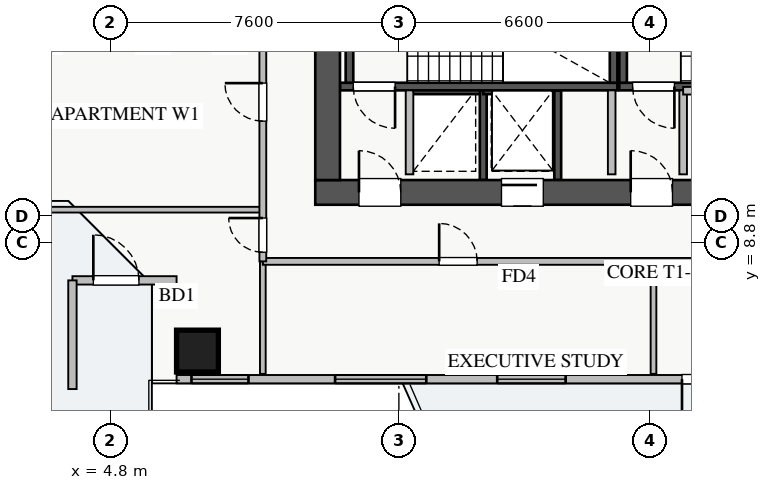
"""IFC4 building model, lengths in metres.
Left out: names, types, materials, properties, quantities, classifications, styles, units other than length and angle.
Written with IfcOpenShell. Run it as: python <this file> out.ifc"""

import sys

from ifc_helpers import new_model, si_unit, direction, frame, frame_2d, origin, origin_2d, place, context, subcontext, project, spatial, rectangle, extrude, source, transform, mapped, element, fill, save


model = new_model("IFC4")
c1 = context("Model", 3, precision=1e-05, world=origin(), true_north=direction((0.0, 1.0)))
c2 = subcontext(c1, "Body", "Model", "MODEL_VIEW")
j1 = project(units=[si_unit("LENGTHUNIT", "METRE"), si_unit("PLANEANGLEUNIT", "RADIAN")], contexts=[c1])
p1 = place(None, origin())
s1 = spatial("IfcSite", under=j1, at=p1, CompositionType="ELEMENT")
p2 = place(p1, origin())
s2 = spatial("IfcBuilding", under=s1, at=p2, CompositionType="ELEMENT")
p3 = place(p2, frame((0.0, 0.0, 103.5)))
s3 = spatial("IfcBuildingStorey", under=s2, at=p3, CompositionType="ELEMENT", Elevation=103.5)
p4 = place(p3, frame((12.68, 12.8, 0.0), z_axis=(0.0, 0.0, 1.0), x_axis=(1.0, 0.0, 0.0)))
e1 = element("IfcWall", 1, at=p4, inside=s3, PredefinedType="SHEAR", context=c2, shape_type="SweptSolid", body=[
    extrude(rectangle(XDim=1.94, YDim=0.18, at=frame_2d((0.97, 0.0))), origin(), (0.0, 0.0, 1.0), 3.07),
])
p5 = place(p3, frame((14.62, 10.45, 0.0), z_axis=(0.0, 0.0, 1.0), x_axis=(0.0, 1.0, 0.0)))
e2 = element("IfcWall", 2, at=p5, inside=s3, PredefinedType="SHEAR", context=c2, shape_type="SweptSolid", body=[
    extrude(rectangle(XDim=2.35, YDim=0.18, at=frame_2d((1.175, 0.0))), origin(), (0.0, 0.0, 1.0), 3.07),
])
p6 = place(p3, frame((14.62, 12.8, 0.0), z_axis=(0.0, 0.0, 1.0), x_axis=(1.0, 0.0, 0.0)))
e3 = element("IfcWall", 3, at=p6, inside=s3, PredefinedType="SHEAR", context=c2, shape_type="SweptSolid", body=[
    extrude(rectangle(XDim=1.96, YDim=0.18, at=frame_2d((0.98, 0.0))), origin(), (0.0, 0.0, 1.0), 3.07),
])
p7 = place(p3, frame((16.58, 10.45, 0.0), z_axis=(0.0, 0.0, 1.0), x_axis=(0.0, 1.0, 0.0)))
e4 = element("IfcWall", 4, at=p7, inside=s3, PredefinedType="SHEAR", context=c2, shape_type="SweptSolid", body=[
    extrude(rectangle(XDim=2.35, YDim=0.18, at=frame_2d((1.175, 0.0))), origin(), (0.0, 0.0, 1.0), 3.07),
])
p8 = place(p3, frame((10.85, 12.91, 0.0), z_axis=(0.0, 0.0, 1.0), x_axis=(1.0, 0.0, 0.0)))
e5 = element("IfcWall", 5, at=p8, inside=s3, PredefinedType="SHEAR", context=c2, shape_type="SweptSolid", body=[
    extrude(rectangle(XDim=7.3, YDim=0.2, at=frame_2d((3.65, 0.0))), origin(), (0.0, 0.0, 1.0), 3.25),
])
p9 = place(p8, frame((0.35, 0.0, 0.0)))
e6 = element("IfcOpeningElement", 6, at=p9, cuts=e5, PredefinedType="OPENING", context=c2, shape_type="SweptSolid", body=[
    extrude(rectangle(XDim=1.1, YDim=2.05, at=frame_2d((0.55, 1.025))), frame((0.0, 0.11, 0.0), z_axis=(0.0, -1.0, 0.0), x_axis=(1.0, 0.0, 0.0)), (0.0, 0.0, 1.0), 0.22),
])
for number, where, z_axis, x_axis in (
    (7, (11.1, 13.01, 0.0), (0.0, 0.0, 1.0), (0.0, 1.0, 0.0)),
    (8, (18.05, 13.01, 0.0), (0.0, 0.0, 1.0), (0.0, 1.0, 0.0)),
):
    element("IfcWall", number, at=place(p3, frame(where, z_axis=z_axis, x_axis=x_axis)), inside=s3, PredefinedType="SHEAR", context=c2, shape_type="SweptSolid", body=[
        extrude(rectangle(XDim=2.94, YDim=0.2, at=frame_2d((1.47, 0.0))), origin(), (0.0, 0.0, 1.0), 3.25),
    ])
p10 = place(p3, frame((18.2, 12.91, 0.0), z_axis=(0.0, 0.0, 1.0), x_axis=(1.0, 0.0, 0.0)))
e9 = element("IfcWall", 9, at=p10, inside=s3, PredefinedType="SHEAR", context=c2, shape_type="SweptSolid", body=[
    extrude(rectangle(XDim=7.15, YDim=0.2, at=frame_2d((3.575, 0.0))), origin(), (0.0, 0.0, 1.0), 3.25),
])
p11 = place(p10, frame((0.35, 0.0, 0.0)))
e10 = element("IfcOpeningElement", 10, at=p11, cuts=e9, PredefinedType="OPENING", context=c2, shape_type="SweptSolid", body=[
    extrude(rectangle(XDim=1.1, YDim=2.05, at=frame_2d((0.55, 1.025))), frame((0.0, 0.11, 0.0), z_axis=(0.0, -1.0, 0.0), x_axis=(1.0, 0.0, 0.0)), (0.0, 0.0, 1.0), 0.22),
])
p12 = place(p3, frame((18.3, 13.01, 0.0), z_axis=(0.0, 0.0, 1.0), x_axis=(0.0, 1.0, 0.0)))
e11 = element("IfcWall", 11, at=p12, inside=s3, PredefinedType="SHEAR", context=c2, shape_type="SweptSolid", body=[
    extrude(rectangle(XDim=2.94, YDim=0.2, at=frame_2d((1.47, 0.0))), origin(), (0.0, 0.0, 1.0), 3.25),
])
p13 = place(p3, frame((10.2, 10.125, 0.0), z_axis=(0.0, 0.0, 1.0), x_axis=(1.0, 0.0, 0.0)))
e12 = element("IfcWall", 12, at=p13, inside=s3, PredefinedType="SHEAR", context=c2, shape_type="SweptSolid", body=[
    extrude(rectangle(XDim=17.6, YDim=0.65, at=frame_2d((8.8, 0.0))), origin(), (0.0, 0.0, 1.0), 3.25),
])
p14 = place(p13, frame((1.15, 0.0, 0.0)))
e13 = element("IfcOpeningElement", 13, at=p14, cuts=e12, PredefinedType="OPENING", context=c2, shape_type="SweptSolid", body=[
    extrude(rectangle(XDim=1.1, YDim=2.05, at=frame_2d((0.55, 1.025))), frame((0.0, 0.335, 0.0), z_axis=(0.0, -1.0, 0.0), x_axis=(1.0, 0.0, 0.0)), (0.0, 0.0, 1.0), 0.67),
])
p15 = place(p13, frame((8.3, 0.0, 0.0)))
e14 = element("IfcOpeningElement", 14, at=p15, cuts=e12, PredefinedType="OPENING", context=c2, shape_type="SweptSolid", body=[
    extrude(rectangle(XDim=1.1, YDim=2.05, at=frame_2d((0.55, 1.025))), frame((0.0, 0.335, 0.0), z_axis=(0.0, -1.0, 0.0), x_axis=(1.0, 0.0, 0.0)), (0.0, 0.0, 1.0), 0.67),
])
p16 = place(p13, frame((4.9, 0.0, 0.0)))
e15 = element("IfcOpeningElement", 15, at=p16, cuts=e12, PredefinedType="OPENING", context=c2, shape_type="SweptSolid", body=[
    extrude(rectangle(XDim=1.1, YDim=2.05, at=frame_2d((0.55, 1.025))), frame((0.0, 0.335, 0.0), z_axis=(0.0, -1.0, 0.0), x_axis=(1.0, 0.0, 0.0)), (0.0, 0.0, 1.0), 0.67),
])
p17 = place(p13, frame((14.74, 0.0, 0.0)))
e16 = element("IfcOpeningElement", 16, at=p17, cuts=e12, PredefinedType="OPENING", context=c2, shape_type="SweptSolid", body=[
    extrude(rectangle(XDim=1.0, YDim=2.05, at=frame_2d((0.5, 1.025))), frame((0.0, 0.335, 0.0), z_axis=(0.0, -1.0, 0.0), x_axis=(1.0, 0.0, 0.0)), (0.0, 0.0, 1.0), 0.67),
])
p18 = place(p13, frame((10.155, 0.0, 0.0)))
e17 = element("IfcOpeningElement", 17, at=p18, cuts=e12, PredefinedType="OPENING", context=c2, shape_type="SweptSolid", body=[
    extrude(rectangle(XDim=1.0, YDim=2.05, at=frame_2d((0.5, 1.025))), frame((0.0, 0.335, 0.0), z_axis=(0.0, -1.0, 0.0), x_axis=(1.0, 0.0, 0.0)), (0.0, 0.0, 1.0), 0.67),
])
p19 = place(p13, frame((11.87, 0.0, 0.0)))
e18 = element("IfcOpeningElement", 18, at=p19, cuts=e12, PredefinedType="OPENING", context=c2, shape_type="SweptSolid", body=[
    extrude(rectangle(XDim=1.0, YDim=2.05, at=frame_2d((0.5, 1.025))), frame((0.0, 0.335, 0.0), z_axis=(0.0, -1.0, 0.0), x_axis=(1.0, 0.0, 0.0)), (0.0, 0.0, 1.0), 0.67),
])
p20 = place(p13, frame((13.46, 0.0, 0.0)))
e19 = element("IfcOpeningElement", 19, at=p20, cuts=e12, PredefinedType="OPENING", context=c2, shape_type="SweptSolid", body=[
    extrude(rectangle(XDim=1.0, YDim=2.05, at=frame_2d((0.5, 1.025))), frame((0.0, 0.335, 0.0), z_axis=(0.0, -1.0, 0.0), x_axis=(1.0, 0.0, 0.0)), (0.0, 0.0, 1.0), 0.67),
])
p21 = place(p3, frame((10.525, 10.45, 0.0), z_axis=(0.0, 0.0, 1.0), x_axis=(0.0, 1.0, 0.0)))
e20 = element("IfcWall", 20, at=p21, inside=s3, PredefinedType="SHEAR", context=c2, shape_type="SweptSolid", body=[
    extrude(rectangle(XDim=5.9, YDim=0.65, at=frame_2d((2.95, 0.0))), origin(), (0.0, 0.0, 1.0), 3.25),
])
m1 = source(origin(), c2, "Body", "SweptSolid", [
    extrude(rectangle(XDim=1.1, YDim=1.1, at=origin_2d()), origin(), (0.0, 0.0, 1.0), 3.25),
])
p22 = place(p3, frame((7.1, 5.95, 0.0), z_axis=(0.0, 0.0, 1.0), x_axis=(1.0, 0.0, 0.0)))
e21 = element("IfcColumn", 21, at=p22, inside=s3, PredefinedType="COLUMN", context=c2, shape_type="MappedRepresentation", body=[
    mapped(m1, transform((0.0, 0.0, 0.0), x_axis=(1.0, 0.0, 0.0), y_axis=(0.0, 1.0, 0.0), z_axis=(0.0, 0.0, 1.0), scale=1.0)),
])
p23 = place(p3, frame((6.55, 5.21, 0.0), z_axis=(0.0, 0.0, 1.0), x_axis=(1.0, 0.0, 0.0)))
e22 = element("IfcWall", 22, at=p23, inside=s3, PredefinedType="STANDARD", context=c2, shape_type="SweptSolid", body=[
    extrude(rectangle(XDim=24.9, YDim=0.22, at=frame_2d((12.45, 0.0))), origin(), (0.0, 0.0, 1.0), 2.61),
])
p24 = place(p23, frame((13.3, 0.0, 0.0)))
e23 = element("IfcOpeningElement", 23, at=p24, cuts=e22, PredefinedType="OPENING", context=c2, shape_type="SweptSolid", body=[
    extrude(rectangle(XDim=1.2, YDim=2.1, at=frame_2d((0.6, 1.05))), frame((0.0, 0.12, 0.0), z_axis=(0.0, -1.0, 0.0), x_axis=(1.0, 0.0, 0.0)), (0.0, 0.0, 1.0), 0.24),
])
p25 = place(p23, frame((0.393, 0.0, 0.9)))
e24 = element("IfcOpeningElement", 24, at=p25, cuts=e22, PredefinedType="OPENING", context=c2, shape_type="SweptSolid", body=[
    extrude(rectangle(XDim=1.5, YDim=1.5, at=frame_2d((0.75, 0.75))), frame((0.0, 0.12, 0.0), z_axis=(0.0, -1.0, 0.0), x_axis=(1.0, 0.0, 0.0)), (0.0, 0.0, 1.0), 0.24),
])
p26 = place(p23, frame((8.438, 0.0, 0.9)))
e25 = element("IfcOpeningElement", 25, at=p26, cuts=e22, PredefinedType="OPENING", context=c2, shape_type="SweptSolid", body=[
    extrude(rectangle(XDim=1.8, YDim=1.45, at=frame_2d((0.9, 0.725))), frame((0.0, 0.12, 0.0), z_axis=(0.0, -1.0, 0.0), x_axis=(1.0, 0.0, 0.0)), (0.0, 0.0, 1.0), 0.24),
])
p27 = place(p23, frame((14.813, 0.0, 0.9)))
e26 = element("IfcOpeningElement", 26, at=p27, cuts=e22, PredefinedType="OPENING", context=c2, shape_type="SweptSolid", body=[
    extrude(rectangle(XDim=1.5, YDim=1.45, at=frame_2d((0.75, 0.725))), frame((0.0, 0.12, 0.0), z_axis=(0.0, -1.0, 0.0), x_axis=(1.0, 0.0, 0.0)), (0.0, 0.0, 1.0), 0.24),
])
p28 = place(p23, frame((20.738, 0.0, 0.9)))
e27 = element("IfcOpeningElement", 27, at=p28, cuts=e22, PredefinedType="OPENING", context=c2, shape_type="SweptSolid", body=[
    extrude(rectangle(XDim=2.1, YDim=1.48, at=frame_2d((1.05, 0.74))), frame((0.0, 0.12, 0.0), z_axis=(0.0, -1.0, 0.0), x_axis=(1.0, 0.0, 0.0)), (0.0, 0.0, 1.0), 0.24),
])
p29 = place(p23, frame((4.171, 0.0, 0.9)))
e28 = element("IfcOpeningElement", 28, at=p29, cuts=e22, PredefinedType="OPENING", context=c2, shape_type="SweptSolid", body=[
    extrude(rectangle(XDim=2.4, YDim=1.5, at=frame_2d((1.2, 0.75))), frame((0.0, 0.12, 0.0), z_axis=(0.0, -1.0, 0.0), x_axis=(1.0, 0.0, 0.0)), (0.0, 0.0, 1.0), 0.24),
])
p30 = place(p3, frame((3.81, 7.81, 0.0), z_axis=(0.0, 0.0, 1.0), x_axis=(1.0, 0.0, 0.0)))
e29 = element("IfcWall", 29, at=p30, inside=s3, PredefinedType="STANDARD", context=c2, shape_type="SweptSolid", body=[
    extrude(rectangle(XDim=2.74, YDim=0.22, at=frame_2d((1.37, 0.0))), origin(), (0.0, 0.0, 1.0), 2.61),
])
p31 = place(p30, frame((0.55, 0.0, 0.0)))
e30 = element("IfcOpeningElement", 30, at=p31, cuts=e29, PredefinedType="OPENING", context=c2, shape_type="SweptSolid", body=[
    extrude(rectangle(XDim=1.2, YDim=2.1, at=frame_2d((0.6, 1.05))), frame((0.0, 0.12, 0.0), z_axis=(0.0, -1.0, 0.0), x_axis=(1.0, 0.0, 0.0)), (0.0, 0.0, 1.0), 0.24),
])
p32 = place(p3, frame((3.81, 4.95, 0.0), z_axis=(0.0, 0.0, 1.0), x_axis=(0.0, 1.0, 0.0)))
e31 = element("IfcWall", 31, at=p32, inside=s3, PredefinedType="STANDARD", context=c2, shape_type="SweptSolid", body=[
    extrude(rectangle(XDim=2.86, YDim=0.22, at=frame_2d((1.43, 0.0))), origin(), (0.0, 0.0, 1.0), 2.61),
])
for number, where, z_axis, x_axis in (
    (32, (12.68, 10.6, 0.0), (0.0, 0.0, 1.0), (0.0, 1.0, 0.0)),
    (33, (18.0, 10.6, 0.0), (0.0, 0.0, 1.0), (0.0, 1.0, 0.0)),
    (34, (19.88, 10.6, 0.0), (0.0, 0.0, 1.0), (0.0, 1.0, 0.0)),
):
    element("IfcWall", number, at=place(p3, frame(where, z_axis=z_axis, x_axis=x_axis)), inside=s3, PredefinedType="PARTITIONING", context=c2, shape_type="SweptSolid", body=[
        extrude(rectangle(XDim=2.21, YDim=0.2, at=frame_2d((1.105, 0.0))), origin(), (0.0, 0.0, 1.0), 3.07),
    ])
p33 = place(p3, frame((19.88, 12.8, 0.0), z_axis=(0.0, 0.0, 1.0), x_axis=(1.0, 0.0, 0.0)))
e35 = element("IfcWall", 35, at=p33, inside=s3, PredefinedType="PARTITIONING", context=c2, shape_type="SweptSolid", body=[
    extrude(rectangle(XDim=1.87, YDim=0.2, at=frame_2d((0.935, 0.0))), origin(), (0.0, 0.0, 1.0), 3.07),
])
p34 = place(p3, frame((19.1, 5.35, 0.0), z_axis=(0.0, 0.0, 1.0), x_axis=(0.0, 1.0, 0.0)))
e36 = element("IfcWall", 36, at=p34, inside=s3, PredefinedType="PARTITIONING", context=c2, shape_type="SweptSolid", body=[
    extrude(rectangle(XDim=2.96, YDim=0.15, at=frame_2d((1.48, 0.0))), origin(), (0.0, 0.0, 1.0), 2.865),
])
p35 = place(p3, frame((8.82, 5.35, 0.0), z_axis=(0.0, 0.0, 1.0), x_axis=(0.0, 1.0, 0.0)))
e37 = element("IfcWall", 37, at=p35, inside=s3, PredefinedType="PARTITIONING", context=c2, shape_type="SweptSolid", body=[
    extrude(rectangle(XDim=2.96, YDim=0.15, at=frame_2d((1.48, 0.0))), origin(), (0.0, 0.0, 1.0), 3.07),
])
p36 = place(p3, frame((8.82, 8.31, 0.0), z_axis=(0.0, 0.0, 1.0), x_axis=(1.0, 0.0, 0.0)))
e38 = element("IfcWall", 38, at=p36, inside=s3, PredefinedType="PARTITIONING", context=c2, shape_type="SweptSolid", body=[
    extrude(rectangle(XDim=23.58, YDim=0.18, at=frame_2d((11.79, 0.0))), origin(), (0.0, 0.0, 1.0), 3.07),
])
p37 = place(p36, frame((4.64, 0.0, 0.0)))
e39 = element("IfcOpeningElement", 39, at=p37, cuts=e38, PredefinedType="OPENING", context=c2, shape_type="SweptSolid", body=[
    extrude(rectangle(XDim=1.0, YDim=2.05, at=frame_2d((0.5, 1.025))), frame((0.0, 0.1, 0.0), z_axis=(0.0, -1.0, 0.0), x_axis=(1.0, 0.0, 0.0)), (0.0, 0.0, 1.0), 0.2),
])
p38 = place(p36, frame((16.22, 0.0, 0.0)))
e40 = element("IfcOpeningElement", 40, at=p38, cuts=e38, PredefinedType="OPENING", context=c2, shape_type="SweptSolid", body=[
    extrude(rectangle(XDim=1.0, YDim=2.05, at=frame_2d((0.5, 1.025))), frame((0.0, 0.1, 0.0), z_axis=(0.0, -1.0, 0.0), x_axis=(1.0, 0.0, 0.0)), (0.0, 0.0, 1.0), 0.2),
])
p39 = place(p3, frame((1.35, 9.67, 0.0), z_axis=(0.0, 0.0, 1.0), x_axis=(1.0, 0.0, 0.0)))
e41 = element("IfcWall", 41, at=p39, inside=s3, PredefinedType="PARTITIONING", context=c2, shape_type="SweptSolid", body=[
    extrude(rectangle(XDim=7.47, YDim=0.15, at=frame_2d((3.735, 0.0))), origin(), (0.0, 0.0, 1.0), 3.07),
])
p40 = place(p3, frame((8.82, 8.31, 0.0), z_axis=(0.0, 0.0, 1.0), x_axis=(0.0, 1.0, 0.0)))
e42 = element("IfcWall", 42, at=p40, inside=s3, PredefinedType="PARTITIONING", context=c2, shape_type="SweptSolid", body=[
    extrude(rectangle(XDim=29.13, YDim=0.18, at=frame_2d((14.565, 0.0))), origin(), (0.0, 0.0, 1.0), 3.07),
])
p41 = place(p40, frame((27.94, 0.0, 0.0)))
e43 = element("IfcOpeningElement", 43, at=p41, cuts=e42, PredefinedType="OPENING", context=c2, shape_type="SweptSolid", body=[
    extrude(rectangle(XDim=0.9, YDim=2.05, at=frame_2d((0.45, 1.025))), frame((0.0, 0.1, 0.0), z_axis=(0.0, -1.0, 0.0), x_axis=(1.0, 0.0, 0.0)), (0.0, 0.0, 1.0), 0.2),
])
p42 = place(p40, frame((0.24, 0.0, 0.0)))
e44 = element("IfcOpeningElement", 44, at=p42, cuts=e42, PredefinedType="OPENING", context=c2, shape_type="SweptSolid", body=[
    extrude(rectangle(XDim=0.9, YDim=2.05, at=frame_2d((0.45, 1.025))), frame((0.0, 0.1, 0.0), z_axis=(0.0, -1.0, 0.0), x_axis=(1.0, 0.0, 0.0)), (0.0, 0.0, 1.0), 0.2),
])
p43 = place(p40, frame((3.69, 0.0, 0.0)))
e45 = element("IfcOpeningElement", 45, at=p43, cuts=e42, PredefinedType="OPENING", context=c2, shape_type="SweptSolid", body=[
    extrude(rectangle(XDim=1.0, YDim=2.05, at=frame_2d((0.5, 1.025))), frame((0.0, 0.1, 0.0), z_axis=(0.0, -1.0, 0.0), x_axis=(1.0, 0.0, 0.0)), (0.0, 0.0, 1.0), 0.2),
])
p44 = place(p40, frame((20.305, 0.0, 0.0)))
e46 = element("IfcOpeningElement", 46, at=p44, cuts=e42, PredefinedType="OPENING", context=c2, shape_type="SweptSolid", body=[
    extrude(rectangle(XDim=1.0, YDim=2.05, at=frame_2d((0.5, 1.025))), frame((0.0, 0.1, 0.0), z_axis=(0.0, -1.0, 0.0), x_axis=(1.0, 0.0, 0.0)), (0.0, 0.0, 1.0), 0.2),
])
m2 = source(origin(), c2, "Body", "SweptSolid", [
    extrude(rectangle(XDim=1.2, YDim=2.1, at=frame_2d((0.6, 1.05))), frame((0.0, 0.025, 0.0), z_axis=(0.0, -1.0, 0.0), x_axis=(1.0, 0.0, 0.0)), (0.0, 0.0, 1.0), 0.05),
])
p45 = place(p24, frame((1.2, 0.0, 0.0), z_axis=(0.0, 0.0, 1.0), x_axis=(-1.0, 0.0, 0.0)))
e47 = element("IfcDoor", 47, at=p45, inside=s3, OperationType="SINGLE_SWING_LEFT", PredefinedType="DOOR", context=c2, shape_type="MappedRepresentation", body=[
    mapped(m2, transform((0.0, 0.0, 0.0), x_axis=(1.0, 0.0, 0.0), y_axis=(0.0, 1.0, 0.0), z_axis=(0.0, 0.0, 1.0), scale=1.0)),
])
fill(e23, e47)
m3 = source(origin(), c2, "Body", "SweptSolid", [
    extrude(rectangle(XDim=1.5, YDim=1.5, at=frame_2d((0.75, 0.75))), frame((0.0, 0.03, 0.0), z_axis=(0.0, -1.0, 0.0), x_axis=(1.0, 0.0, 0.0)), (0.0, 0.0, 1.0), 0.06),
])
p46 = place(p25, origin())
e48 = element("IfcWindow", 48, at=p46, inside=s3, PartitioningType="TRIPLE_PANEL_VERTICAL", PredefinedType="WINDOW", context=c2, shape_type="MappedRepresentation", body=[
    mapped(m3, transform((0.0, 0.0, 0.0), x_axis=(1.0, 0.0, 0.0), y_axis=(0.0, 1.0, 0.0), z_axis=(0.0, 0.0, 1.0), scale=1.0)),
])
fill(e24, e48)
m4 = source(origin(), c2, "Body", "SweptSolid", [
    extrude(rectangle(XDim=1.8, YDim=1.45, at=frame_2d((0.9, 0.725))), frame((0.0, 0.03, 0.0), z_axis=(0.0, -1.0, 0.0), x_axis=(1.0, 0.0, 0.0)), (0.0, 0.0, 1.0), 0.06),
])
p47 = place(p26, origin())
e49 = element("IfcWindow", 49, at=p47, inside=s3, PartitioningType="DOUBLE_PANEL_VERTICAL", PredefinedType="WINDOW", context=c2, shape_type="MappedRepresentation", body=[
    mapped(m4, transform((0.0, 0.0, 0.0), x_axis=(1.0, 0.0, 0.0), y_axis=(0.0, 1.0, 0.0), z_axis=(0.0, 0.0, 1.0), scale=1.0)),
])
fill(e25, e49)
p48 = place(p31, origin())
e50 = element("IfcDoor", 50, at=p48, inside=s3, OperationType="SINGLE_SWING_LEFT", PredefinedType="DOOR", context=c2, shape_type="MappedRepresentation", body=[
    mapped(m2, transform((0.0, 0.0, 0.0), x_axis=(1.0, 0.0, 0.0), y_axis=(0.0, 1.0, 0.0), z_axis=(0.0, 0.0, 1.0), scale=1.0)),
])
fill(e30, e50)
m5 = source(origin(), c2, "Body", "SweptSolid", [
    extrude(rectangle(XDim=1.1, YDim=2.05, at=frame_2d((0.55, 1.025))), frame((0.0, 0.025, 0.0), z_axis=(0.0, -1.0, 0.0), x_axis=(1.0, 0.0, 0.0)), (0.0, 0.0, 1.0), 0.05),
])
p49 = place(p14, origin())
e51 = element("IfcDoor", 51, at=p49, inside=s3, OperationType="SINGLE_SWING_LEFT", PredefinedType="DOOR", context=c2, shape_type="MappedRepresentation", body=[
    mapped(m5, transform((0.0, 0.0, 0.0), x_axis=(1.0, 0.0, 0.0), y_axis=(0.0, 1.0, 0.0), z_axis=(0.0, 0.0, 1.0), scale=1.0)),
])
fill(e13, e51)
p50 = place(p9, frame((1.1, 0.0, 0.0), z_axis=(0.0, 0.0, 1.0), x_axis=(-1.0, 0.0, 0.0)))
e52 = element("IfcDoor", 52, at=p50, inside=s3, OperationType="SINGLE_SWING_RIGHT", PredefinedType="DOOR", context=c2, shape_type="MappedRepresentation", body=[
    mapped(m5, transform((0.0, 0.0, 0.0), x_axis=(1.0, 0.0, 0.0), y_axis=(0.0, 1.0, 0.0), z_axis=(0.0, 0.0, 1.0), scale=1.0)),
])
fill(e6, e52)
p51 = place(p15, origin())
e53 = element("IfcDoor", 53, at=p51, inside=s3, OperationType="SINGLE_SWING_LEFT", PredefinedType="DOOR", context=c2, shape_type="MappedRepresentation", body=[
    mapped(m5, transform((0.0, 0.0, 0.0), x_axis=(1.0, 0.0, 0.0), y_axis=(0.0, 1.0, 0.0), z_axis=(0.0, 0.0, 1.0), scale=1.0)),
])
fill(e14, e53)
p52 = place(p11, frame((1.1, 0.0, 0.0), z_axis=(0.0, 0.0, 1.0), x_axis=(-1.0, 0.0, 0.0)))
e54 = element("IfcDoor", 54, at=p52, inside=s3, OperationType="SINGLE_SWING_RIGHT", PredefinedType="DOOR", context=c2, shape_type="MappedRepresentation", body=[
    mapped(m5, transform((0.0, 0.0, 0.0), x_axis=(1.0, 0.0, 0.0), y_axis=(0.0, 1.0, 0.0), z_axis=(0.0, 0.0, 1.0), scale=1.0)),
])
fill(e10, e54)
p53 = place(p16, origin())
e55 = element("IfcDoor", 55, at=p53, inside=s3, OperationType="SLIDING_TO_RIGHT", PredefinedType="DOOR", context=c2, shape_type="MappedRepresentation", body=[
    mapped(m5, transform((0.0, 0.0, 0.0), x_axis=(1.0, 0.0, 0.0), y_axis=(0.0, 1.0, 0.0), z_axis=(0.0, 0.0, 1.0), scale=1.0)),
])
fill(e15, e55)
m6 = source(origin(), c2, "Body", "SweptSolid", [
    extrude(rectangle(XDim=1.0, YDim=2.05, at=frame_2d((0.5, 1.025))), frame((0.0, 0.025, 0.0), z_axis=(0.0, -1.0, 0.0), x_axis=(1.0, 0.0, 0.0)), (0.0, 0.0, 1.0), 0.05),
])
p54 = place(p37, origin())
e56 = element("IfcDoor", 56, at=p54, inside=s3, OperationType="SINGLE_SWING_LEFT", PredefinedType="DOOR", context=c2, shape_type="MappedRepresentation", body=[
    mapped(m6, transform((0.0, 0.0, 0.0), x_axis=(1.0, 0.0, 0.0), y_axis=(0.0, 1.0, 0.0), z_axis=(0.0, 0.0, 1.0), scale=1.0)),
])
fill(e39, e56)
m7 = source(origin(), c2, "Body", "SweptSolid", [
    extrude(rectangle(XDim=0.9, YDim=2.05, at=frame_2d((0.45, 1.025))), frame((0.0, 0.025, 0.0), z_axis=(0.0, -1.0, 0.0), x_axis=(1.0, 0.0, 0.0)), (0.0, 0.0, 1.0), 0.05),
])
p55 = place(p42, origin())
e57 = element("IfcDoor", 57, at=p55, inside=s3, OperationType="SINGLE_SWING_RIGHT", PredefinedType="DOOR", context=c2, shape_type="MappedRepresentation", body=[
    mapped(m7, transform((0.0, 0.0, 0.0), x_axis=(1.0, 0.0, 0.0), y_axis=(0.0, 1.0, 0.0), z_axis=(0.0, 0.0, 1.0), scale=1.0)),
])
fill(e44, e57)
p56 = place(p43, origin())
e58 = element("IfcDoor", 58, at=p56, inside=s3, OperationType="SINGLE_SWING_RIGHT", PredefinedType="DOOR", context=c2, shape_type="MappedRepresentation", body=[
    mapped(m6, transform((0.0, 0.0, 0.0), x_axis=(1.0, 0.0, 0.0), y_axis=(0.0, 1.0, 0.0), z_axis=(0.0, 0.0, 1.0), scale=1.0)),
])
fill(e45, e58)
m8 = source(origin(), c2, "Body", "SweptSolid", [
    extrude(rectangle(XDim=2.4, YDim=1.5, at=frame_2d((1.2, 0.75))), frame((0.0, 0.03, 0.0), z_axis=(0.0, -1.0, 0.0), x_axis=(1.0, 0.0, 0.0)), (0.0, 0.0, 1.0), 0.06),
])
p57 = place(p29, origin())
e59 = element("IfcWindow", 59, at=p57, inside=s3, PartitioningType="TRIPLE_PANEL_VERTICAL", PredefinedType="WINDOW", context=c2, shape_type="MappedRepresentation", body=[
    mapped(m8, transform((0.0, 0.0, 0.0), x_axis=(1.0, 0.0, 0.0), y_axis=(0.0, 1.0, 0.0), z_axis=(0.0, 0.0, 1.0), scale=1.0)),
])
fill(e28, e59)
save(model, sys.argv[1])
